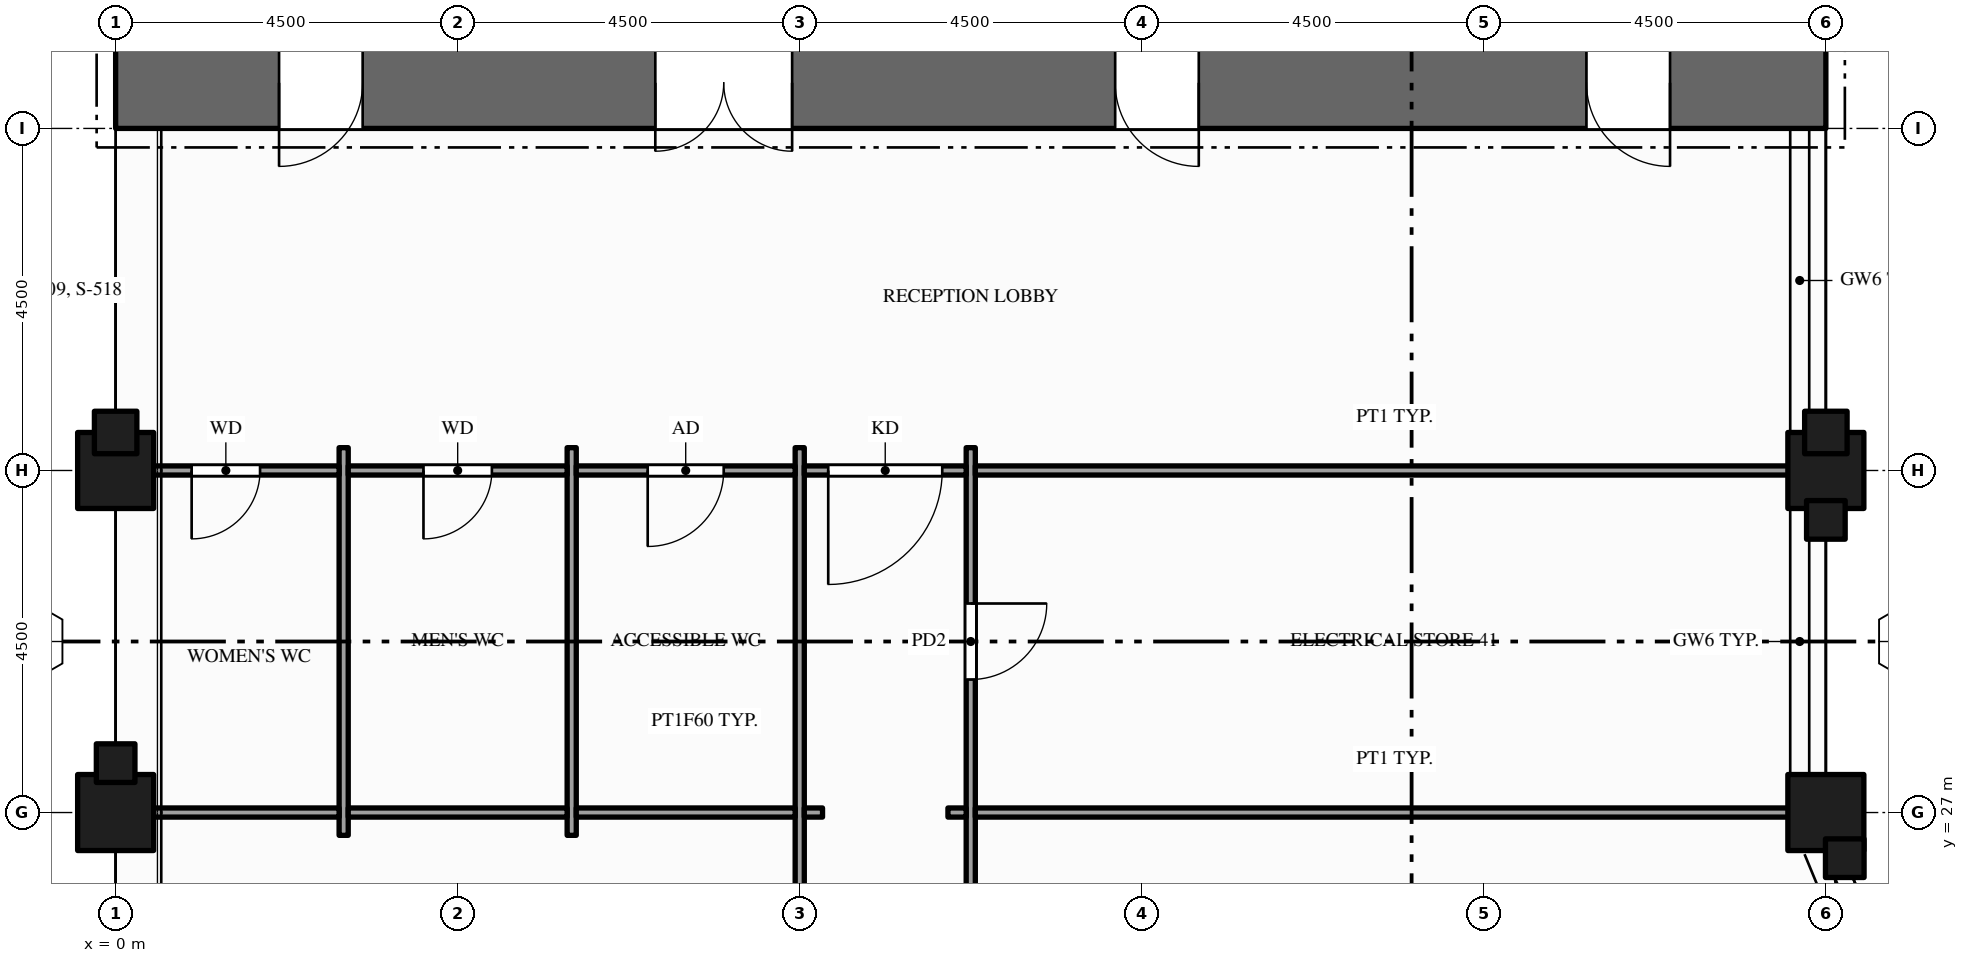
"""IFC4 building model, lengths in metres.
Left out: names, types, materials, properties, quantities, classifications, styles, units other than length and angle.
Written with IfcOpenShell. Run it as: python <this file> out.ifc"""

import sys

from ifc_helpers import new_model, si_unit, direction, frame, frame_2d, origin, origin_2d, place, context, subcontext, project, spatial, rectangle, hollow_rectangle, extrude, element, fill, save


model = new_model("IFC4")
c1 = context("Model", 3, precision=1e-05, world=origin(), true_north=direction((0.0, 1.0)))
c2 = subcontext(c1, "Body", "Model", "MODEL_VIEW")
j1 = project(units=[si_unit("LENGTHUNIT", "METRE"), si_unit("PLANEANGLEUNIT", "RADIAN")], contexts=[c1])
p1 = place(None, origin())
s1 = spatial("IfcSite", under=j1, at=p1, CompositionType="ELEMENT")
p2 = place(p1, origin())
s2 = spatial("IfcBuilding", under=s1, at=p2, CompositionType="ELEMENT")
p3 = place(p2, frame((0.0, 0.0, 131.0)))
s3 = spatial("IfcBuildingStorey", under=s2, at=p3, CompositionType="ELEMENT", Elevation=131.0)
p4 = place(p3, frame((0.0, 36.6, -0.15), z_axis=(0.0, 0.0, 1.0), x_axis=(1.0, 0.0, 0.0)))
e1 = element("IfcWall", 1, at=p4, inside=s3, PredefinedType="SHEAR", context=c2, shape_type="SweptSolid", body=[
    extrude(rectangle(XDim=22.5, YDim=1.2, at=frame_2d((11.25, 0.0))), origin(), (0.0, 0.0, 1.0), 8.0),
])
p5 = place(p4, frame((7.1, 0.0, 0.15)))
e2 = element("IfcOpeningElement", 2, at=p5, cuts=e1, PredefinedType="OPENING", context=c2, shape_type="SweptSolid", body=[
    extrude(rectangle(XDim=1.8, YDim=2.1, at=frame_2d((0.9, 1.05))), frame((0.0, 0.61, 0.0), z_axis=(0.0, -1.0, 0.0), x_axis=(1.0, 0.0, 0.0)), (0.0, 0.0, 1.0), 1.22),
])
p6 = place(p4, frame((13.15, 0.0, 0.15)))
e3 = element("IfcOpeningElement", 3, at=p6, cuts=e1, PredefinedType="OPENING", context=c2, shape_type="SweptSolid", body=[
    extrude(rectangle(XDim=1.1, YDim=2.1, at=frame_2d((0.55, 1.05))), frame((0.0, 0.61, 0.0), z_axis=(0.0, -1.0, 0.0), x_axis=(1.0, 0.0, 0.0)), (0.0, 0.0, 1.0), 1.22),
])
p7 = place(p4, frame((2.15, 0.0, 0.15)))
e4 = element("IfcOpeningElement", 4, at=p7, cuts=e1, PredefinedType="OPENING", context=c2, shape_type="SweptSolid", body=[
    extrude(rectangle(XDim=1.1, YDim=2.1, at=frame_2d((0.55, 1.05))), frame((0.0, 0.61, 0.0), z_axis=(0.0, -1.0, 0.0), x_axis=(1.0, 0.0, 0.0)), (0.0, 0.0, 1.0), 1.22),
])
p8 = place(p4, frame((19.35, 0.0, 0.15)))
e5 = element("IfcOpeningElement", 5, at=p8, cuts=e1, PredefinedType="OPENING", context=c2, shape_type="SweptSolid", body=[
    extrude(rectangle(XDim=1.1, YDim=2.1, at=frame_2d((0.55, 1.05))), frame((0.0, 0.61, 0.0), z_axis=(0.0, -1.0, 0.0), x_axis=(1.0, 0.0, 0.0)), (0.0, 0.0, 1.0), 1.22),
])
for number, where, z_axis, x_axis in (
    (6, (0.0, 27.0, -0.25), (0.0, 0.0, 1.0), (1.0, 0.0, 0.0)),
    (7, (0.0, 31.5, -0.25), (0.0, 0.0, 1.0), (1.0, 0.0, 0.0)),
    (8, (22.5, 27.0, -0.25), (0.0, 0.0, 1.0), (1.0, 0.0, 0.0)),
    (9, (22.5, 31.5, -0.25), (0.0, 0.0, 1.0), (1.0, 0.0, 0.0)),
):
    element("IfcColumn", number, at=place(p3, frame(where, z_axis=z_axis, x_axis=x_axis)), inside=s3, PredefinedType="COLUMN", context=c2, shape_type="SweptSolid", body=[
        extrude(hollow_rectangle(XDim=1.0, YDim=1.0, WallThickness=0.05, at=origin_2d()), origin(), (0.0, 0.0, 1.0), 8.1),
    ])
for number, where, z_axis, x_axis in (
    (10, (3.0, 26.7, 0.0), (0.0, 0.0, 1.0), (0.0, 1.0, 0.0)),
    (11, (6.0, 26.7, 0.0), (0.0, 0.0, 1.0), (0.0, 1.0, 0.0)),
):
    element("IfcWall", number, at=place(p3, frame(where, z_axis=z_axis, x_axis=x_axis)), inside=s3, PredefinedType="PARTITIONING", context=c2, shape_type="SweptSolid", body=[
        extrude(rectangle(XDim=5.1, YDim=0.12, at=frame_2d((2.55, 0.0))), origin(), (0.0, 0.0, 1.0), 7.85),
    ])
p9 = place(p3, frame((9.0, 10.95, 0.0), z_axis=(0.0, 0.0, 1.0), x_axis=(0.0, 1.0, 0.0)))
e12 = element("IfcWall", 12, at=p9, inside=s3, PredefinedType="PARTITIONING", context=c2, shape_type="SweptSolid", body=[
    extrude(rectangle(XDim=20.85, YDim=0.12, at=frame_2d((10.425, 0.0))), origin(), (0.0, 0.0, 1.0), 6.6),
])
p10 = place(p9, frame((2.05, 0.0, 0.0)))
e13 = element("IfcOpeningElement", 13, at=p10, cuts=e12, PredefinedType="OPENING", context=c2, shape_type="SweptSolid", body=[
    extrude(rectangle(XDim=1.0, YDim=2.1, at=frame_2d((0.5, 1.05))), frame((0.0, 0.07, 0.0), z_axis=(0.0, -1.0, 0.0), x_axis=(1.0, 0.0, 0.0)), (0.0, 0.0, 1.0), 0.14),
])
p11 = place(p9, frame((6.55, 0.0, 0.0)))
e14 = element("IfcOpeningElement", 14, at=p11, cuts=e12, PredefinedType="OPENING", context=c2, shape_type="SweptSolid", body=[
    extrude(rectangle(XDim=1.0, YDim=2.1, at=frame_2d((0.5, 1.05))), frame((0.0, 0.07, 0.0), z_axis=(0.0, -1.0, 0.0), x_axis=(1.0, 0.0, 0.0)), (0.0, 0.0, 1.0), 0.14),
])
p12 = place(p9, frame((12.105, 0.0, 0.0)))
e15 = element("IfcOpeningElement", 15, at=p12, cuts=e12, PredefinedType="OPENING", context=c2, shape_type="SweptSolid", body=[
    extrude(rectangle(XDim=1.2, YDim=2.1, at=frame_2d((0.6, 1.05))), frame((0.0, 0.07, 0.0), z_axis=(0.0, -1.0, 0.0), x_axis=(1.0, 0.0, 0.0)), (0.0, 0.0, 1.0), 0.14),
])
p13 = place(p3, frame((11.25, 10.95, 0.0), z_axis=(0.0, 0.0, 1.0), x_axis=(0.0, 1.0, 0.0)))
e16 = element("IfcWall", 16, at=p13, inside=s3, PredefinedType="PARTITIONING", context=c2, shape_type="SweptSolid", body=[
    extrude(rectangle(XDim=20.85, YDim=0.12, at=frame_2d((10.425, 0.0))), origin(), (0.0, 0.0, 1.0), 6.6),
])
p14 = place(p13, frame((17.8, 0.0, 0.0)))
e17 = element("IfcOpeningElement", 17, at=p14, cuts=e16, PredefinedType="OPENING", context=c2, shape_type="SweptSolid", body=[
    extrude(rectangle(XDim=1.0, YDim=2.1, at=frame_2d((0.5, 1.05))), frame((0.0, 0.07, 0.0), z_axis=(0.0, -1.0, 0.0), x_axis=(1.0, 0.0, 0.0)), (0.0, 0.0, 1.0), 0.14),
])
p15 = place(p13, frame((4.2, 0.0, 0.0)))
e18 = element("IfcOpeningElement", 18, at=p15, cuts=e16, PredefinedType="OPENING", context=c2, shape_type="SweptSolid", body=[
    extrude(rectangle(XDim=1.2, YDim=2.1, at=frame_2d((0.6, 1.05))), frame((0.0, 0.07, 0.0), z_axis=(0.0, -1.0, 0.0), x_axis=(1.0, 0.0, 0.0)), (0.0, 0.0, 1.0), 0.14),
])
p16 = place(p3, frame((0.15, 27.0, 0.0), z_axis=(0.0, 0.0, 1.0), x_axis=(1.0, 0.0, 0.0)))
e19 = element("IfcWall", 19, at=p16, inside=s3, PredefinedType="PARTITIONING", context=c2, shape_type="SweptSolid", body=[
    extrude(rectangle(XDim=2.79, YDim=0.12, at=frame_2d((1.395, 0.0))), origin(), (0.0, 0.0, 1.0), 6.87),
])
for number, where, z_axis, x_axis in (
    (20, (3.06, 27.0, 0.0), (0.0, 0.0, 1.0), (1.0, 0.0, 0.0)),
    (21, (6.06, 27.0, 0.0), (0.0, 0.0, 1.0), (1.0, 0.0, 0.0)),
):
    element("IfcWall", number, at=place(p3, frame(where, z_axis=z_axis, x_axis=x_axis)), inside=s3, PredefinedType="PARTITIONING", context=c2, shape_type="SweptSolid", body=[
        extrude(rectangle(XDim=2.88, YDim=0.12, at=frame_2d((1.44, 0.0))), origin(), (0.0, 0.0, 1.0), 6.87),
    ])
for number, where, z_axis, x_axis in (
    (22, (9.06, 27.0, 0.0), (0.0, 0.0, 1.0), (1.0, 0.0, 0.0)),
    (23, (10.95, 27.0, 0.0), (0.0, 0.0, 1.0), (1.0, 0.0, 0.0)),
):
    element("IfcWall", number, at=place(p3, frame(where, z_axis=z_axis, x_axis=x_axis)), inside=s3, PredefinedType="PARTITIONING", context=c2, shape_type="SweptSolid", body=[
        extrude(rectangle(XDim=0.24, YDim=0.12, at=frame_2d((0.12, 0.0))), origin(), (0.0, 0.0, 1.0), 6.87),
    ])
p17 = place(p3, frame((11.31, 27.0, 0.0), z_axis=(0.0, 0.0, 1.0), x_axis=(1.0, 0.0, 0.0)))
e24 = element("IfcWall", 24, at=p17, inside=s3, PredefinedType="PARTITIONING", context=c2, shape_type="SweptSolid", body=[
    extrude(rectangle(XDim=11.04, YDim=0.12, at=frame_2d((5.52, 0.0))), origin(), (0.0, 0.0, 1.0), 6.87),
])
p18 = place(p3, frame((0.15, 31.5, 0.0), z_axis=(0.0, 0.0, 1.0), x_axis=(1.0, 0.0, 0.0)))
e25 = element("IfcWall", 25, at=p18, inside=s3, PredefinedType="PARTITIONING", context=c2, shape_type="SweptSolid", body=[
    extrude(rectangle(XDim=2.79, YDim=0.12, at=frame_2d((1.395, 0.0))), origin(), (0.0, 0.0, 1.0), 6.87),
])
p19 = place(p18, frame((0.85, 0.0, 0.0)))
e26 = element("IfcOpeningElement", 26, at=p19, cuts=e25, PredefinedType="OPENING", context=c2, shape_type="SweptSolid", body=[
    extrude(rectangle(XDim=0.9, YDim=2.1, at=frame_2d((0.45, 1.05))), frame((0.0, 0.07, 0.0), z_axis=(0.0, -1.0, 0.0), x_axis=(1.0, 0.0, 0.0)), (0.0, 0.0, 1.0), 0.14),
])
p20 = place(p3, frame((3.06, 31.5, 0.0), z_axis=(0.0, 0.0, 1.0), x_axis=(1.0, 0.0, 0.0)))
e27 = element("IfcWall", 27, at=p20, inside=s3, PredefinedType="PARTITIONING", context=c2, shape_type="SweptSolid", body=[
    extrude(rectangle(XDim=2.88, YDim=0.12, at=frame_2d((1.44, 0.0))), origin(), (0.0, 0.0, 1.0), 6.87),
])
p21 = place(p20, frame((0.99, 0.0, 0.0)))
e28 = element("IfcOpeningElement", 28, at=p21, cuts=e27, PredefinedType="OPENING", context=c2, shape_type="SweptSolid", body=[
    extrude(rectangle(XDim=0.9, YDim=2.1, at=frame_2d((0.45, 1.05))), frame((0.0, 0.07, 0.0), z_axis=(0.0, -1.0, 0.0), x_axis=(1.0, 0.0, 0.0)), (0.0, 0.0, 1.0), 0.14),
])
p22 = place(p3, frame((6.06, 31.5, 0.0), z_axis=(0.0, 0.0, 1.0), x_axis=(1.0, 0.0, 0.0)))
e29 = element("IfcWall", 29, at=p22, inside=s3, PredefinedType="PARTITIONING", context=c2, shape_type="SweptSolid", body=[
    extrude(rectangle(XDim=2.88, YDim=0.12, at=frame_2d((1.44, 0.0))), origin(), (0.0, 0.0, 1.0), 6.87),
])
p23 = place(p22, frame((0.94, 0.0, 0.0)))
e30 = element("IfcOpeningElement", 30, at=p23, cuts=e29, PredefinedType="OPENING", context=c2, shape_type="SweptSolid", body=[
    extrude(rectangle(XDim=1.0, YDim=2.1, at=frame_2d((0.5, 1.05))), frame((0.0, 0.07, 0.0), z_axis=(0.0, -1.0, 0.0), x_axis=(1.0, 0.0, 0.0)), (0.0, 0.0, 1.0), 0.14),
])
p24 = place(p3, frame((9.06, 31.5, 0.0), z_axis=(0.0, 0.0, 1.0), x_axis=(1.0, 0.0, 0.0)))
e31 = element("IfcWall", 31, at=p24, inside=s3, PredefinedType="PARTITIONING", context=c2, shape_type="SweptSolid", body=[
    extrude(rectangle(XDim=2.13, YDim=0.12, at=frame_2d((1.065, 0.0))), origin(), (0.0, 0.0, 1.0), 6.87),
])
p25 = place(p24, frame((0.315, 0.0, 0.0)))
e32 = element("IfcOpeningElement", 32, at=p25, cuts=e31, PredefinedType="OPENING", context=c2, shape_type="SweptSolid", body=[
    extrude(rectangle(XDim=1.5, YDim=2.1, at=frame_2d((0.75, 1.05))), frame((0.0, 0.07, 0.0), z_axis=(0.0, -1.0, 0.0), x_axis=(1.0, 0.0, 0.0)), (0.0, 0.0, 1.0), 0.14),
])
p26 = place(p3, frame((11.31, 31.5, 0.0), z_axis=(0.0, 0.0, 1.0), x_axis=(1.0, 0.0, 0.0)))
e33 = element("IfcWall", 33, at=p26, inside=s3, PredefinedType="PARTITIONING", context=c2, shape_type="SweptSolid", body=[
    extrude(rectangle(XDim=11.04, YDim=0.12, at=frame_2d((5.52, 0.0))), origin(), (0.0, 0.0, 1.0), 6.45),
])
p27 = place(p5, origin())
e34 = element("IfcDoor", 34, at=p27, inside=s3, OperationType="DOUBLE_DOOR_SINGLE_SWING", PredefinedType="DOOR", context=c2, shape_type="SweptSolid", body=[
    extrude(rectangle(XDim=1.8, YDim=2.1, at=frame_2d((0.9, 1.05))), frame((0.0, 0.025, 0.0), z_axis=(0.0, -1.0, 0.0), x_axis=(1.0, 0.0, 0.0)), (0.0, 0.0, 1.0), 0.05),
])
fill(e2, e34)
p28 = place(p6, origin())
e35 = element("IfcDoor", 35, at=p28, inside=s3, OperationType="SINGLE_SWING_RIGHT", PredefinedType="DOOR", context=c2, shape_type="SweptSolid", body=[
    extrude(rectangle(XDim=1.1, YDim=2.1, at=frame_2d((0.55, 1.05))), frame((0.0, 0.025, 0.0), z_axis=(0.0, -1.0, 0.0), x_axis=(1.0, 0.0, 0.0)), (0.0, 0.0, 1.0), 0.05),
])
fill(e3, e35)
p29 = place(p7, origin())
e36 = element("IfcDoor", 36, at=p29, inside=s3, OperationType="SINGLE_SWING_LEFT", PredefinedType="DOOR", context=c2, shape_type="SweptSolid", body=[
    extrude(rectangle(XDim=1.1, YDim=2.1, at=frame_2d((0.55, 1.05))), frame((0.0, 0.025, 0.0), z_axis=(0.0, -1.0, 0.0), x_axis=(1.0, 0.0, 0.0)), (0.0, 0.0, 1.0), 0.05),
])
fill(e4, e36)
p30 = place(p8, origin())
e37 = element("IfcDoor", 37, at=p30, inside=s3, OperationType="SINGLE_SWING_RIGHT", PredefinedType="DOOR", context=c2, shape_type="SweptSolid", body=[
    extrude(rectangle(XDim=1.1, YDim=2.1, at=frame_2d((0.55, 1.05))), frame((0.0, 0.025, 0.0), z_axis=(0.0, -1.0, 0.0), x_axis=(1.0, 0.0, 0.0)), (0.0, 0.0, 1.0), 0.05),
])
fill(e5, e37)
p31 = place(p25, origin())
e38 = element("IfcDoor", 38, at=p31, inside=s3, OperationType="SINGLE_SWING_LEFT", PredefinedType="DOOR", context=c2, shape_type="SweptSolid", body=[
    extrude(rectangle(XDim=1.5, YDim=2.1, at=frame_2d((0.75, 1.05))), frame((0.0, 0.025, 0.0), z_axis=(0.0, -1.0, 0.0), x_axis=(1.0, 0.0, 0.0)), (0.0, 0.0, 1.0), 0.05),
])
fill(e32, e38)
p32 = place(p19, origin())
e39 = element("IfcDoor", 39, at=p32, inside=s3, OperationType="SINGLE_SWING_LEFT", PredefinedType="DOOR", context=c2, shape_type="SweptSolid", body=[
    extrude(rectangle(XDim=0.9, YDim=2.1, at=frame_2d((0.45, 1.05))), frame((0.0, 0.025, 0.0), z_axis=(0.0, -1.0, 0.0), x_axis=(1.0, 0.0, 0.0)), (0.0, 0.0, 1.0), 0.05),
])
fill(e26, e39)
p33 = place(p21, origin())
e40 = element("IfcDoor", 40, at=p33, inside=s3, OperationType="SINGLE_SWING_LEFT", PredefinedType="DOOR", context=c2, shape_type="SweptSolid", body=[
    extrude(rectangle(XDim=0.9, YDim=2.1, at=frame_2d((0.45, 1.05))), frame((0.0, 0.025, 0.0), z_axis=(0.0, -1.0, 0.0), x_axis=(1.0, 0.0, 0.0)), (0.0, 0.0, 1.0), 0.05),
])
fill(e28, e40)
p34 = place(p23, origin())
e41 = element("IfcDoor", 41, at=p34, inside=s3, OperationType="SINGLE_SWING_LEFT", PredefinedType="DOOR", context=c2, shape_type="SweptSolid", body=[
    extrude(rectangle(XDim=1.0, YDim=2.1, at=frame_2d((0.5, 1.05))), frame((0.0, 0.025, 0.0), z_axis=(0.0, -1.0, 0.0), x_axis=(1.0, 0.0, 0.0)), (0.0, 0.0, 1.0), 0.05),
])
fill(e30, e41)
p35 = place(p14, origin())
e42 = element("IfcDoor", 42, at=p35, inside=s3, OperationType="SINGLE_SWING_RIGHT", PredefinedType="DOOR", context=c2, shape_type="SweptSolid", body=[
    extrude(rectangle(XDim=1.0, YDim=2.1, at=frame_2d((0.5, 1.05))), frame((0.0, 0.025, 0.0), z_axis=(0.0, -1.0, 0.0), x_axis=(1.0, 0.0, 0.0)), (0.0, 0.0, 1.0), 0.05),
])
fill(e17, e42)
save(model, sys.argv[1])
